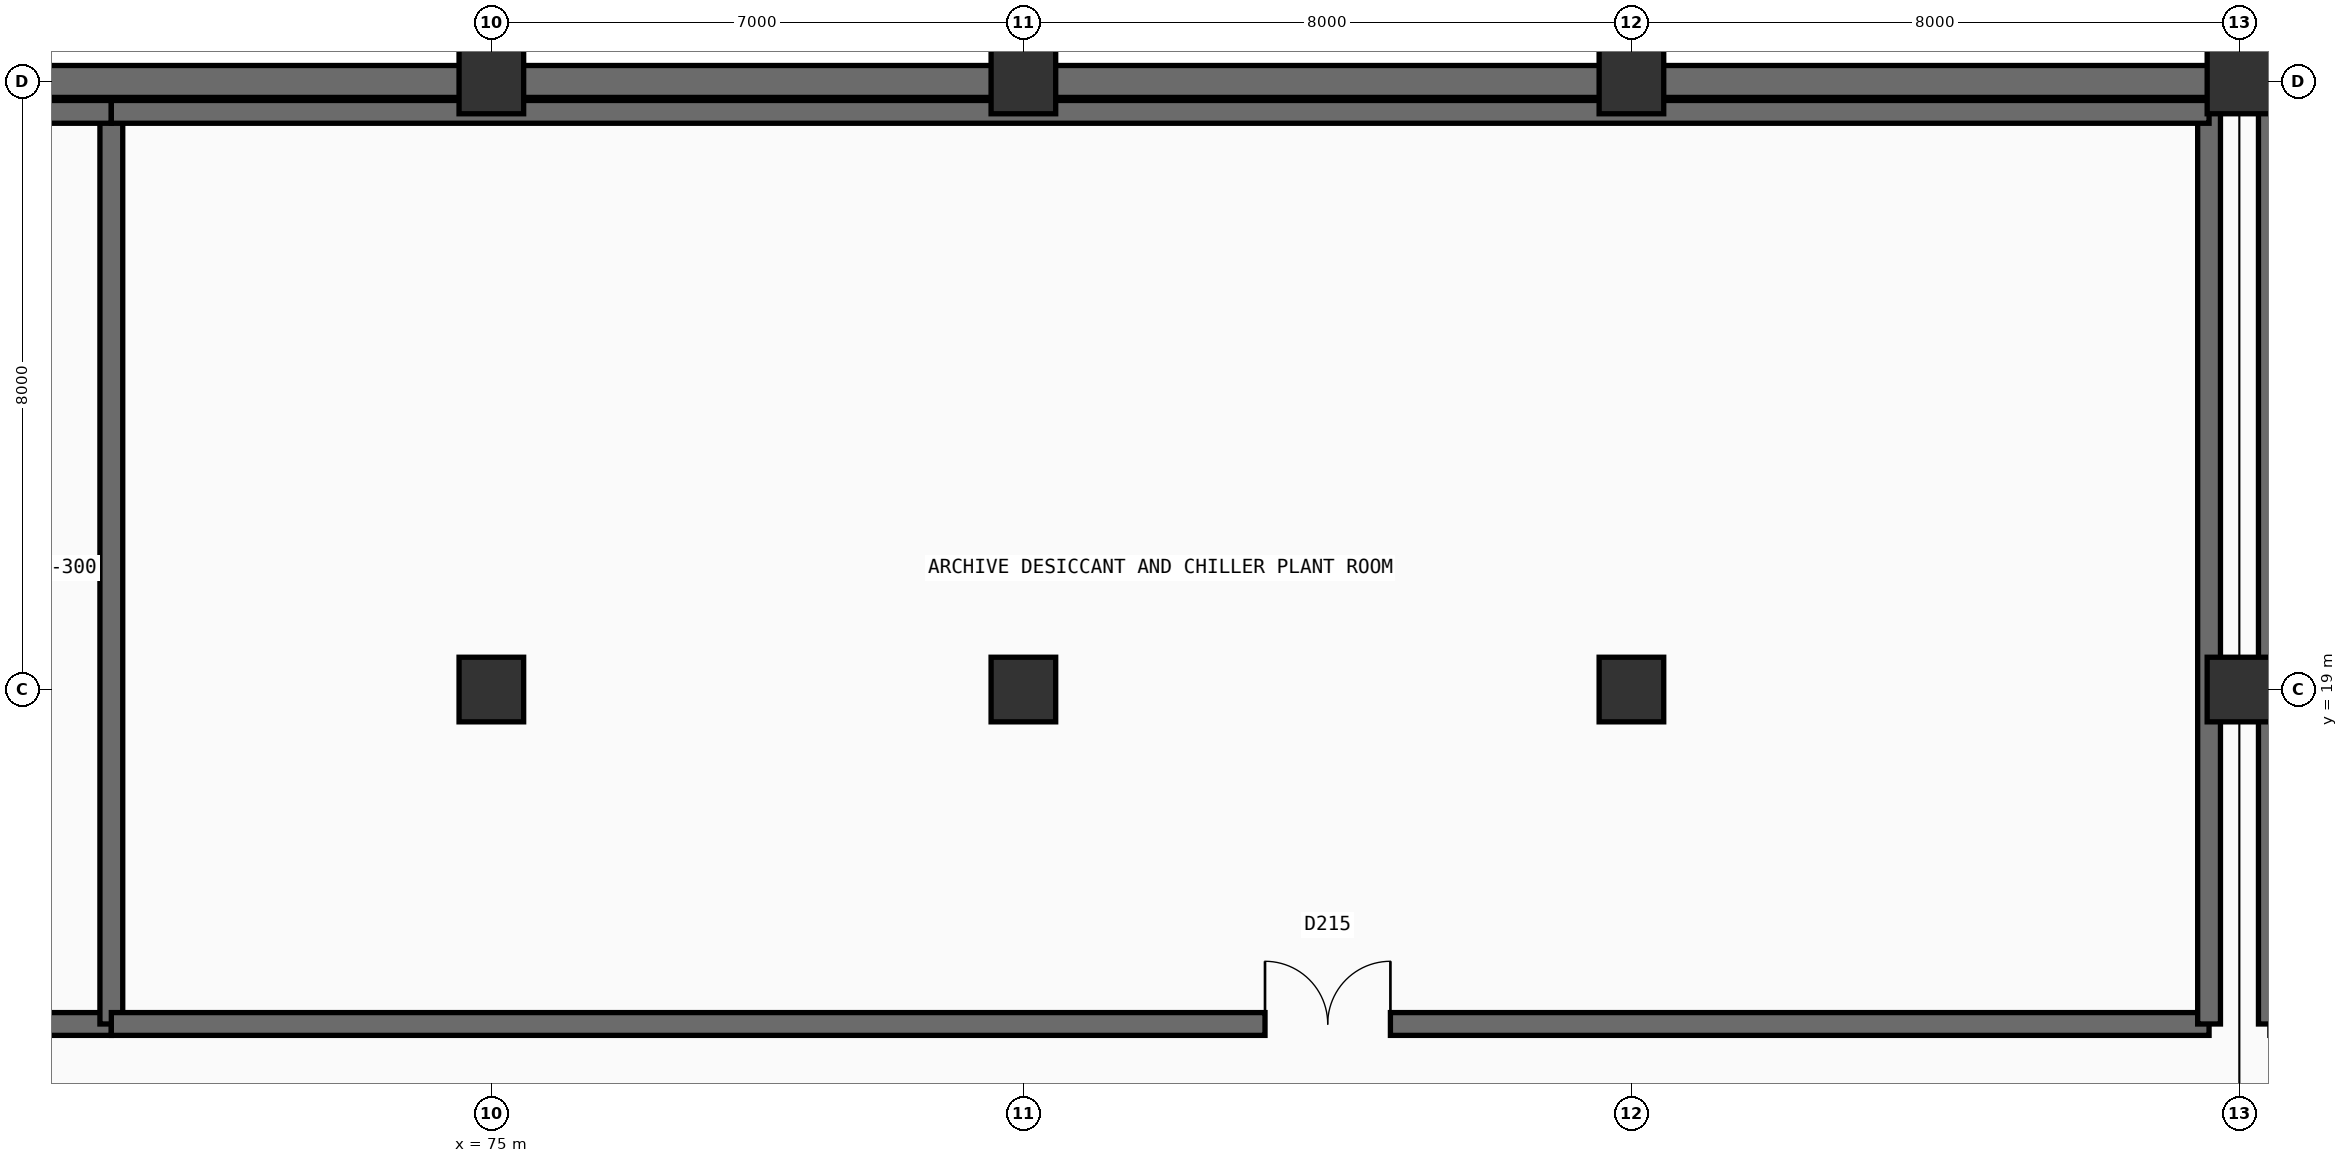
"""IFC4 building model, lengths in metres.
Left out: names, types, materials, properties, quantities, classifications, styles, units other than length and angle.
Written with IfcOpenShell. Run it as: python <this file> out.ifc"""

import sys

from ifc_helpers import new_model, si_unit, direction, frame, frame_2d, origin, origin_2d, place, context, subcontext, project, spatial, rectangle, extrude, element, fill, save


model = new_model("IFC4")
c1 = context("Model", 3, precision=1e-05, world=origin(), true_north=direction((0.0, 1.0)))
c2 = subcontext(c1, "Body", "Model", "MODEL_VIEW")
j1 = project(units=[si_unit("LENGTHUNIT", "METRE"), si_unit("PLANEANGLEUNIT", "RADIAN")], contexts=[c1])
p1 = place(None, origin())
s1 = spatial("IfcSite", under=j1, at=p1, CompositionType="ELEMENT")
p2 = place(p1, origin())
s2 = spatial("IfcBuilding", under=s1, at=p2, CompositionType="ELEMENT")
p3 = place(p2, frame((0.0, 0.0, -4.5)))
s3 = spatial("IfcBuildingStorey", under=s2, at=p3, CompositionType="ELEMENT", Elevation=-4.5)
for number, where, z_axis, x_axis in (
    (1, (75.0, 19.0, -0.6), (0.0, 0.0, 1.0), (1.0, 0.0, 0.0)),
    (2, (75.0, 27.0, -0.6), (0.0, 0.0, 1.0), (1.0, 0.0, 0.0)),
    (3, (82.0, 19.0, -0.6), (0.0, 0.0, 1.0), (1.0, 0.0, 0.0)),
    (4, (82.0, 27.0, -0.6), (0.0, 0.0, 1.0), (1.0, 0.0, 0.0)),
    (5, (90.0, 19.0, -0.6), (0.0, 0.0, 1.0), (1.0, 0.0, 0.0)),
    (6, (90.0, 27.0, -0.6), (0.0, 0.0, 1.0), (1.0, 0.0, 0.0)),
    (7, (98.0, 19.0, -0.6), (0.0, 0.0, 1.0), (1.0, 0.0, 0.0)),
    (8, (98.0, 27.0, -0.6), (0.0, 0.0, 1.0), (1.0, 0.0, 0.0)),
):
    element("IfcColumn", number, at=place(p3, frame(where, z_axis=z_axis, x_axis=x_axis)), inside=s3, PredefinedType="COLUMN", context=c2, shape_type="SweptSolid", body=[
        extrude(rectangle(XDim=0.85, YDim=0.85, at=origin_2d()), origin(), (0.0, 0.0, 1.0), 5.1),
    ])
for number, where, z_axis, x_axis in (
    (9, (98.0, 27.0, 0.0), (0.0, 0.0, 1.0), (1.0, 0.0, 0.0)),
    (10, (67.0, 27.0, 0.0), (0.0, 0.0, 1.0), (1.0, 0.0, 0.0)),
):
    element("IfcWall", number, at=place(p3, frame(where, z_axis=z_axis, x_axis=x_axis)), inside=s3, PredefinedType="USERDEFINED", context=c2, shape_type="SweptSolid", body=[
        extrude(rectangle(XDim=8.0, YDim=0.42, at=frame_2d((4.0, 0.0))), origin(), (0.0, 0.0, 1.0), 4.5),
    ])
p4 = place(p3, frame((75.0, 27.0, 0.0), z_axis=(0.0, 0.0, 1.0), x_axis=(1.0, 0.0, 0.0)))
e11 = element("IfcWall", 11, at=p4, inside=s3, PredefinedType="USERDEFINED", context=c2, shape_type="SweptSolid", body=[
    extrude(rectangle(XDim=7.0, YDim=0.42, at=frame_2d((3.5, 0.0))), origin(), (0.0, 0.0, 1.0), 4.5),
])
for number, where, z_axis, x_axis in (
    (12, (82.0, 27.0, 0.0), (0.0, 0.0, 1.0), (1.0, 0.0, 0.0)),
    (13, (90.0, 27.0, 0.0), (0.0, 0.0, 1.0), (1.0, 0.0, 0.0)),
):
    element("IfcWall", number, at=place(p3, frame(where, z_axis=z_axis, x_axis=x_axis)), inside=s3, PredefinedType="USERDEFINED", context=c2, shape_type="SweptSolid", body=[
        extrude(rectangle(XDim=8.0, YDim=0.42, at=frame_2d((4.0, 0.0))), origin(), (0.0, 0.0, 1.0), 4.5),
    ])
p5 = place(p3, frame((43.0, 14.6, 0.0), z_axis=(0.0, 0.0, 1.0), x_axis=(1.0, 0.0, 0.0)))
e14 = element("IfcWall", 14, at=p5, inside=s3, PredefinedType="SHEAR", context=c2, shape_type="SweptSolid", body=[
    extrude(rectangle(XDim=27.0, YDim=0.3, at=frame_2d((13.5, 0.0))), origin(), (0.0, 0.0, 1.0), 4.2),
])
p6 = place(p5, frame((11.122, 0.0, 0.0)))
e15 = element("IfcOpeningElement", 15, at=p6, cuts=e14, PredefinedType="OPENING", context=c2, shape_type="SweptSolid", body=[
    extrude(rectangle(XDim=1.75, YDim=2.28, at=frame_2d((0.875, 1.14))), frame((0.0, 0.16, 0.0), z_axis=(0.0, -1.0, 0.0), x_axis=(1.0, 0.0, 0.0)), (0.0, 0.0, 1.0), 0.32),
])
p7 = place(p3, frame((70.0, 14.6, 0.0), z_axis=(0.0, 0.0, 1.0), x_axis=(0.0, 1.0, 0.0)))
e16 = element("IfcWall", 16, at=p7, inside=s3, PredefinedType="SHEAR", context=c2, shape_type="SweptSolid", body=[
    extrude(rectangle(XDim=12.0, YDim=0.3, at=frame_2d((6.0, 0.0))), origin(), (0.0, 0.0, 1.0), 4.2),
])
p8 = place(p3, frame((43.0, 26.6, 0.0), z_axis=(0.0, 0.0, 1.0), x_axis=(1.0, 0.0, 0.0)))
e17 = element("IfcWall", 17, at=p8, inside=s3, PredefinedType="SHEAR", context=c2, shape_type="SweptSolid", body=[
    extrude(rectangle(XDim=27.0, YDim=0.3, at=frame_2d((13.5, 0.0))), origin(), (0.0, 0.0, 1.0), 4.2),
])
p9 = place(p3, frame((70.0, 14.6, 0.0), z_axis=(0.0, 0.0, 1.0), x_axis=(1.0, 0.0, 0.0)))
e18 = element("IfcWall", 18, at=p9, inside=s3, PredefinedType="SHEAR", context=c2, shape_type="SweptSolid", body=[
    extrude(rectangle(XDim=27.6, YDim=0.3, at=frame_2d((13.8, 0.0))), origin(), (0.0, 0.0, 1.0), 4.2),
])
p10 = place(p9, frame((15.179, 0.0, 0.0)))
e19 = element("IfcOpeningElement", 19, at=p10, cuts=e18, PredefinedType="OPENING", context=c2, shape_type="SweptSolid", body=[
    extrude(rectangle(XDim=1.65, YDim=2.25, at=frame_2d((0.825, 1.125))), frame((0.0, 0.16, 0.0), z_axis=(0.0, -1.0, 0.0), x_axis=(1.0, 0.0, 0.0)), (0.0, 0.0, 1.0), 0.32),
])
p11 = place(p3, frame((97.6, 14.6, 0.0), z_axis=(0.0, 0.0, 1.0), x_axis=(0.0, 1.0, 0.0)))
e20 = element("IfcWall", 20, at=p11, inside=s3, PredefinedType="SHEAR", context=c2, shape_type="SweptSolid", body=[
    extrude(rectangle(XDim=12.0, YDim=0.3, at=frame_2d((6.0, 0.0))), origin(), (0.0, 0.0, 1.0), 4.2),
])
p12 = place(p3, frame((70.0, 26.6, 0.0), z_axis=(0.0, 0.0, 1.0), x_axis=(1.0, 0.0, 0.0)))
e21 = element("IfcWall", 21, at=p12, inside=s3, PredefinedType="SHEAR", context=c2, shape_type="SweptSolid", body=[
    extrude(rectangle(XDim=27.6, YDim=0.3, at=frame_2d((13.8, 0.0))), origin(), (0.0, 0.0, 1.0), 4.2),
])
p13 = place(p3, frame((98.4, 14.6, 0.0), z_axis=(0.0, 0.0, 1.0), x_axis=(0.0, 1.0, 0.0)))
e22 = element("IfcWall", 22, at=p13, inside=s3, PredefinedType="SHEAR", context=c2, shape_type="SweptSolid", body=[
    extrude(rectangle(XDim=12.6, YDim=0.3, at=frame_2d((6.3, 0.0))), origin(), (0.0, 0.0, 1.0), 4.2),
])
p14 = place(p10, origin())
e23 = element("IfcDoor", 23, at=p14, inside=s3, OperationType="DOUBLE_DOOR_SINGLE_SWING", PredefinedType="DOOR", context=c2, shape_type="SweptSolid", body=[
    extrude(rectangle(XDim=1.65, YDim=2.25, at=frame_2d((0.825, 1.125))), frame((0.0, 0.025, 0.0), z_axis=(0.0, -1.0, 0.0), x_axis=(1.0, 0.0, 0.0)), (0.0, 0.0, 1.0), 0.05),
])
fill(e19, e23)
save(model, sys.argv[1])
